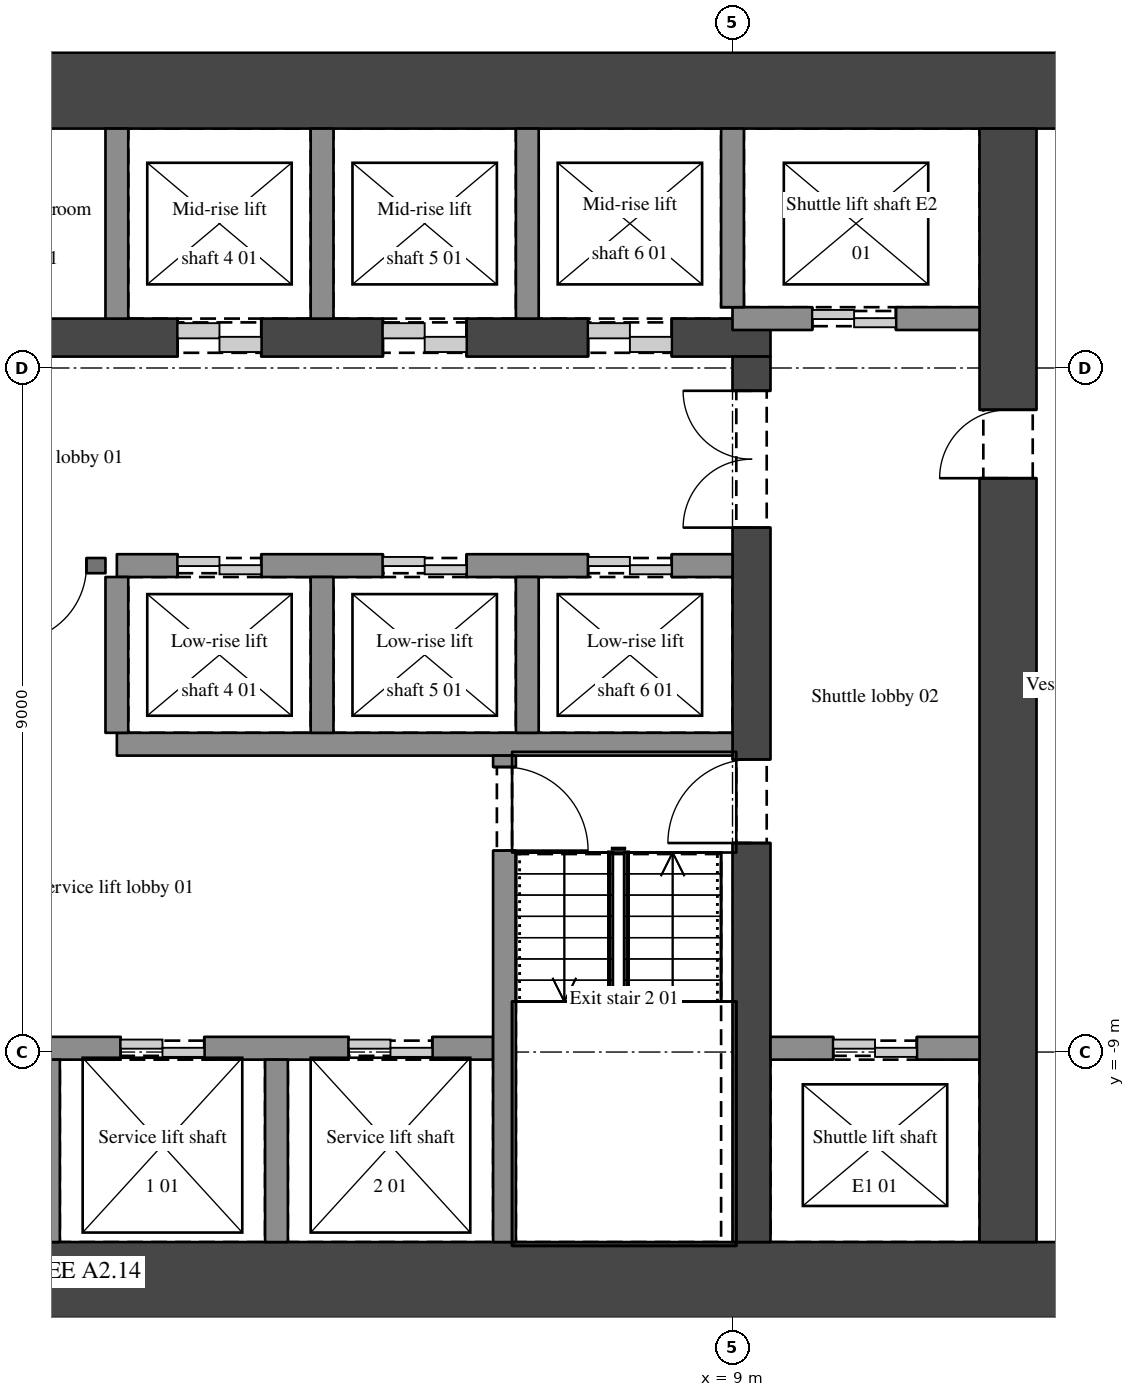
"""IFC4 building model, lengths in metres.
Left out: names, types, materials, properties, quantities, classifications, styles, units other than length and angle.
Written with IfcOpenShell. Run it as: python <this file> out.ifc"""

import sys

from ifc_helpers import new_model, si_unit, direction, frame, frame_2d, origin, place, context, subcontext, project, spatial, rectangle, extrude, element, fill, save


model = new_model("IFC4")
c1 = context("Model", 3, precision=1e-05, world=origin(), true_north=direction((0.0, 1.0)))
c2 = subcontext(c1, "Body", "Model", "MODEL_VIEW")
j1 = project(units=[si_unit("LENGTHUNIT", "METRE"), si_unit("PLANEANGLEUNIT", "RADIAN")], contexts=[c1])
p1 = place(None, origin())
s1 = spatial("IfcSite", under=j1, at=p1, CompositionType="ELEMENT")
p2 = place(p1, origin())
s2 = spatial("IfcBuilding", under=s1, at=p2, CompositionType="ELEMENT")
p3 = place(p2, frame((0.0, 0.0, 108.9)))
s3 = spatial("IfcBuildingStorey", under=s2, at=p3, CompositionType="ELEMENT", Elevation=108.9)
for number, where, z_axis, x_axis in (
    (1, (-15.0, -12.0, 0.0), (0.0, 0.0, 1.0), (1.0, 0.0, 0.0)),
    (2, (-15.0, 3.65, 0.0), (0.0, 0.0, 1.0), (1.0, 0.0, 0.0)),
):
    element("IfcWall", number, at=place(p3, frame(where, z_axis=z_axis, x_axis=x_axis)), inside=s3, PredefinedType="SHEAR", context=c2, shape_type="SweptSolid", body=[
        extrude(rectangle(XDim=30.0, YDim=1.0, at=frame_2d((15.0, 0.0))), origin(), (0.0, 0.0, 1.0), 5.4),
    ])
p4 = place(p3, frame((12.625, -11.5, 0.0), z_axis=(0.0, 0.0, 1.0), x_axis=(0.0, 1.0, 0.0)))
e3 = element("IfcWall", 3, at=p4, inside=s3, PredefinedType="SHEAR", context=c2, shape_type="SweptSolid", body=[
    extrude(rectangle(XDim=14.65, YDim=0.75, at=frame_2d((7.325, 0.0))), origin(), (0.0, 0.0, 1.0), 5.4),
])
p5 = place(p4, frame((10.05, 0.0, 0.0)))
e4 = element("IfcOpeningElement", 4, at=p5, cuts=e3, PredefinedType="OPENING", context=c2, shape_type="SweptSolid", body=[
    extrude(rectangle(XDim=0.9, YDim=2.1, at=frame_2d((0.45, 1.05))), frame((0.0, 0.385, 0.0), z_axis=(0.0, -1.0, 0.0), x_axis=(1.0, 0.0, 0.0)), (0.0, 0.0, 1.0), 0.77),
])
p6 = place(p3, frame((-9.5, 0.4, 0.0), z_axis=(0.0, 0.0, 1.0), x_axis=(1.0, 0.0, 0.0)))
e5 = element("IfcWall", 5, at=p6, inside=s3, PredefinedType="SHEAR", context=c2, shape_type="SweptSolid", body=[
    extrude(rectangle(XDim=19.0, YDim=0.5, at=frame_2d((9.5, 0.0))), origin(), (0.0, 0.0, 1.0), 5.4),
])
p7 = place(p6, frame((1.3, 0.0, 0.0)))
e6 = element("IfcOpeningElement", 6, at=p7, cuts=e5, PredefinedType="OPENING", context=c2, shape_type="SweptSolid", body=[
    extrude(rectangle(XDim=1.1, YDim=2.1, at=frame_2d((0.55, 1.05))), frame((0.0, 0.26, 0.0), z_axis=(0.0, -1.0, 0.0), x_axis=(1.0, 0.0, 0.0)), (0.0, 0.0, 1.0), 0.52),
])
p8 = place(p6, frame((4.0, 0.0, 0.0)))
e7 = element("IfcOpeningElement", 7, at=p8, cuts=e5, PredefinedType="OPENING", context=c2, shape_type="SweptSolid", body=[
    extrude(rectangle(XDim=1.1, YDim=2.1, at=frame_2d((0.55, 1.05))), frame((0.0, 0.26, 0.0), z_axis=(0.0, -1.0, 0.0), x_axis=(1.0, 0.0, 0.0)), (0.0, 0.0, 1.0), 0.52),
])
p9 = place(p6, frame((6.7, 0.0, 0.0)))
e8 = element("IfcOpeningElement", 8, at=p9, cuts=e5, PredefinedType="OPENING", context=c2, shape_type="SweptSolid", body=[
    extrude(rectangle(XDim=1.1, YDim=2.1, at=frame_2d((0.55, 1.05))), frame((0.0, 0.26, 0.0), z_axis=(0.0, -1.0, 0.0), x_axis=(1.0, 0.0, 0.0)), (0.0, 0.0, 1.0), 0.52),
])
p10 = place(p6, frame((11.2, 0.0, 0.0)))
e9 = element("IfcOpeningElement", 9, at=p10, cuts=e5, PredefinedType="OPENING", context=c2, shape_type="SweptSolid", body=[
    extrude(rectangle(XDim=1.1, YDim=2.1, at=frame_2d((0.55, 1.05))), frame((0.0, 0.26, 0.0), z_axis=(0.0, -1.0, 0.0), x_axis=(1.0, 0.0, 0.0)), (0.0, 0.0, 1.0), 0.52),
])
p11 = place(p6, frame((13.9, 0.0, 0.0)))
e10 = element("IfcOpeningElement", 10, at=p11, cuts=e5, PredefinedType="OPENING", context=c2, shape_type="SweptSolid", body=[
    extrude(rectangle(XDim=1.1, YDim=2.1, at=frame_2d((0.55, 1.05))), frame((0.0, 0.26, 0.0), z_axis=(0.0, -1.0, 0.0), x_axis=(1.0, 0.0, 0.0)), (0.0, 0.0, 1.0), 0.52),
])
p12 = place(p6, frame((16.6, 0.0, 0.0)))
e11 = element("IfcOpeningElement", 11, at=p12, cuts=e5, PredefinedType="OPENING", context=c2, shape_type="SweptSolid", body=[
    extrude(rectangle(XDim=1.1, YDim=2.1, at=frame_2d((0.55, 1.05))), frame((0.0, 0.26, 0.0), z_axis=(0.0, -1.0, 0.0), x_axis=(1.0, 0.0, 0.0)), (0.0, 0.0, 1.0), 0.52),
])
p13 = place(p3, frame((9.25, -11.5, 0.0), z_axis=(0.0, 0.0, 1.0), x_axis=(0.0, 1.0, 0.0)))
e12 = element("IfcWall", 12, at=p13, inside=s3, PredefinedType="SHEAR", context=c2, shape_type="SweptSolid", body=[
    extrude(rectangle(XDim=11.65, YDim=0.5, at=frame_2d((5.825, 0.0))), origin(), (0.0, 0.0, 1.0), 5.4),
])
p14 = place(p13, frame((9.4, 0.0, 0.0)))
e13 = element("IfcOpeningElement", 13, at=p14, cuts=e12, PredefinedType="OPENING", context=c2, shape_type="SweptSolid", body=[
    extrude(rectangle(XDim=1.8, YDim=2.1, at=frame_2d((0.9, 1.05))), frame((0.0, 0.26, 0.0), z_axis=(0.0, -1.0, 0.0), x_axis=(1.0, 0.0, 0.0)), (0.0, 0.0, 1.0), 0.52),
])
p15 = place(p13, frame((5.25, 0.0, 0.0)))
e14 = element("IfcOpeningElement", 14, at=p15, cuts=e12, PredefinedType="OPENING", context=c2, shape_type="SweptSolid", body=[
    extrude(rectangle(XDim=1.1, YDim=2.1, at=frame_2d((0.55, 1.05))), frame((0.0, 0.26, 0.0), z_axis=(0.0, -1.0, 0.0), x_axis=(1.0, 0.0, 0.0)), (0.0, 0.0, 1.0), 0.52),
])
p16 = place(p3, frame((-5.85, -8.95, 0.0), z_axis=(0.0, 0.0, 1.0), x_axis=(1.0, 0.0, 0.0)))
e15 = element("IfcWall", 15, at=p16, inside=s3, PredefinedType="SHEAR", context=c2, shape_type="SweptSolid", body=[
    extrude(rectangle(XDim=11.7, YDim=0.3, at=frame_2d((5.85, 0.0))), origin(), (0.0, 0.0, 1.0), 5.4),
])
p17 = place(p16, frame((0.8, 0.0, 0.0)))
e16 = element("IfcOpeningElement", 16, at=p17, cuts=e15, PredefinedType="OPENING", context=c2, shape_type="SweptSolid", body=[
    extrude(rectangle(XDim=1.1, YDim=2.1, at=frame_2d((0.55, 1.05))), frame((0.0, 0.16, 0.0), z_axis=(0.0, -1.0, 0.0), x_axis=(1.0, 0.0, 0.0)), (0.0, 0.0, 1.0), 0.32),
])
p18 = place(p16, frame((3.8, 0.0, 0.0)))
e17 = element("IfcOpeningElement", 17, at=p18, cuts=e15, PredefinedType="OPENING", context=c2, shape_type="SweptSolid", body=[
    extrude(rectangle(XDim=1.1, YDim=2.1, at=frame_2d((0.55, 1.05))), frame((0.0, 0.16, 0.0), z_axis=(0.0, -1.0, 0.0), x_axis=(1.0, 0.0, 0.0)), (0.0, 0.0, 1.0), 0.32),
])
p19 = place(p16, frame((6.8, 0.0, 0.0)))
e18 = element("IfcOpeningElement", 18, at=p19, cuts=e15, PredefinedType="OPENING", context=c2, shape_type="SweptSolid", body=[
    extrude(rectangle(XDim=1.1, YDim=2.1, at=frame_2d((0.55, 1.05))), frame((0.0, 0.16, 0.0), z_axis=(0.0, -1.0, 0.0), x_axis=(1.0, 0.0, 0.0)), (0.0, 0.0, 1.0), 0.32),
])
p20 = place(p16, frame((9.8, 0.0, 0.0)))
e19 = element("IfcOpeningElement", 19, at=p20, cuts=e15, PredefinedType="OPENING", context=c2, shape_type="SweptSolid", body=[
    extrude(rectangle(XDim=1.1, YDim=2.1, at=frame_2d((0.55, 1.05))), frame((0.0, 0.16, 0.0), z_axis=(0.0, -1.0, 0.0), x_axis=(1.0, 0.0, 0.0)), (0.0, 0.0, 1.0), 0.32),
])
p21 = place(p3, frame((9.5, -8.95, 0.0), z_axis=(0.0, 0.0, 1.0), x_axis=(1.0, 0.0, 0.0)))
e20 = element("IfcWall", 20, at=p21, inside=s3, PredefinedType="SHEAR", context=c2, shape_type="SweptSolid", body=[
    extrude(rectangle(XDim=2.75, YDim=0.3, at=frame_2d((1.375, 0.0))), origin(), (0.0, 0.0, 1.0), 5.4),
])
p22 = place(p21, frame((0.825, 0.0, 0.0)))
e21 = element("IfcOpeningElement", 21, at=p22, cuts=e20, PredefinedType="OPENING", context=c2, shape_type="SweptSolid", body=[
    extrude(rectangle(XDim=1.1, YDim=2.1, at=frame_2d((0.55, 1.05))), frame((0.0, 0.16, 0.0), z_axis=(0.0, -1.0, 0.0), x_axis=(1.0, 0.0, 0.0)), (0.0, 0.0, 1.0), 0.32),
])
p23 = place(p3, frame((0.9, -4.95, 0.0), z_axis=(0.0, 0.0, 1.0), x_axis=(1.0, 0.0, 0.0)))
e22 = element("IfcWall", 22, at=p23, inside=s3, PredefinedType="SHEAR", context=c2, shape_type="SweptSolid", body=[
    extrude(rectangle(XDim=8.1, YDim=0.3, at=frame_2d((4.05, 0.0))), origin(), (0.0, 0.0, 1.0), 5.4),
])
p24 = place(p3, frame((0.75, -2.6, 0.0), z_axis=(0.0, 0.0, 1.0), x_axis=(-1.0, 0.0, 0.0)))
e23 = element("IfcWall", 23, at=p24, inside=s3, PredefinedType="SOLIDWALL", context=c2, shape_type="SweptSolid", body=[
    extrude(rectangle(XDim=1.5, YDim=0.2, at=frame_2d((0.75, 0.0))), origin(), (0.0, 0.0, 1.0), 5.1),
])
p25 = place(p24, frame((0.25, 0.0, 0.0)))
e24 = element("IfcOpeningElement", 24, at=p25, cuts=e23, PredefinedType="OPENING", context=c2, shape_type="SweptSolid", body=[
    extrude(rectangle(XDim=1.0, YDim=2.1, at=frame_2d((0.5, 1.05))), frame((0.0, 0.11, 0.0), z_axis=(0.0, -1.0, 0.0), x_axis=(1.0, 0.0, 0.0)), (0.0, 0.0, 1.0), 0.22),
])
p26 = place(p3, frame((0.9, -2.6, 0.0), z_axis=(0.0, 0.0, 1.0), x_axis=(1.0, 0.0, 0.0)))
e25 = element("IfcWall", 25, at=p26, inside=s3, PredefinedType="SHEAR", context=c2, shape_type="SweptSolid", body=[
    extrude(rectangle(XDim=8.1, YDim=0.3, at=frame_2d((4.05, 0.0))), origin(), (0.0, 0.0, 1.0), 5.4),
])
p27 = place(p26, frame((0.8, 0.0, 0.0)))
e26 = element("IfcOpeningElement", 26, at=p27, cuts=e25, PredefinedType="OPENING", context=c2, shape_type="SweptSolid", body=[
    extrude(rectangle(XDim=1.1, YDim=2.1, at=frame_2d((0.55, 1.05))), frame((0.0, 0.16, 0.0), z_axis=(0.0, -1.0, 0.0), x_axis=(1.0, 0.0, 0.0)), (0.0, 0.0, 1.0), 0.32),
])
p28 = place(p26, frame((3.5, 0.0, 0.0)))
e27 = element("IfcOpeningElement", 27, at=p28, cuts=e25, PredefinedType="OPENING", context=c2, shape_type="SweptSolid", body=[
    extrude(rectangle(XDim=1.1, YDim=2.1, at=frame_2d((0.55, 1.05))), frame((0.0, 0.16, 0.0), z_axis=(0.0, -1.0, 0.0), x_axis=(1.0, 0.0, 0.0)), (0.0, 0.0, 1.0), 0.32),
])
p29 = place(p26, frame((6.2, 0.0, 0.0)))
e28 = element("IfcOpeningElement", 28, at=p29, cuts=e25, PredefinedType="OPENING", context=c2, shape_type="SweptSolid", body=[
    extrude(rectangle(XDim=1.1, YDim=2.1, at=frame_2d((0.55, 1.05))), frame((0.0, 0.16, 0.0), z_axis=(0.0, -1.0, 0.0), x_axis=(1.0, 0.0, 0.0)), (0.0, 0.0, 1.0), 0.32),
])
p30 = place(p3, frame((12.25, 0.65, 0.0), z_axis=(0.0, 0.0, 1.0), x_axis=(-1.0, 0.0, 0.0)))
e29 = element("IfcWall", 29, at=p30, inside=s3, PredefinedType="SHEAR", context=c2, shape_type="SweptSolid", body=[
    extrude(rectangle(XDim=3.25, YDim=0.3, at=frame_2d((1.625, 0.0))), origin(), (0.0, 0.0, 1.0), 5.4),
])
p31 = place(p30, frame((1.1, 0.0, 0.0)))
e30 = element("IfcOpeningElement", 30, at=p31, cuts=e29, PredefinedType="OPENING", context=c2, shape_type="SweptSolid", body=[
    extrude(rectangle(XDim=1.1, YDim=2.1, at=frame_2d((0.55, 1.05))), frame((0.0, 0.16, 0.0), z_axis=(0.0, -1.0, 0.0), x_axis=(1.0, 0.0, 0.0)), (0.0, 0.0, 1.0), 0.32),
])
p32 = place(p3, frame((0.0, -11.5, 0.0), z_axis=(0.0, 0.0, 1.0), x_axis=(0.0, 1.0, 0.0)))
e31 = element("IfcWall", 31, at=p32, inside=s3, PredefinedType="SHEAR", context=c2, shape_type="SweptSolid", body=[
    extrude(rectangle(XDim=2.4, YDim=0.3, at=frame_2d((1.2, 0.0))), origin(), (0.0, 0.0, 1.0), 5.4),
])
p33 = place(p3, frame((0.9, -4.8, 0.0), z_axis=(0.0, 0.0, 1.0), x_axis=(0.0, 1.0, 0.0)))
e32 = element("IfcWall", 32, at=p33, inside=s3, PredefinedType="SHEAR", context=c2, shape_type="SweptSolid", body=[
    extrude(rectangle(XDim=2.05, YDim=0.3, at=frame_2d((1.025, 0.0))), origin(), (0.0, 0.0, 1.0), 5.4),
])
p34 = place(p3, frame((0.9, 0.65, 0.0), z_axis=(0.0, 0.0, 1.0), x_axis=(0.0, 1.0, 0.0)))
e33 = element("IfcWall", 33, at=p34, inside=s3, PredefinedType="SHEAR", context=c2, shape_type="SweptSolid", body=[
    extrude(rectangle(XDim=2.5, YDim=0.3, at=frame_2d((1.25, 0.0))), origin(), (0.0, 0.0, 1.0), 5.4),
])
p35 = place(p3, frame((3.0, -11.5, 0.0), z_axis=(0.0, 0.0, 1.0), x_axis=(0.0, 1.0, 0.0)))
e34 = element("IfcWall", 34, at=p35, inside=s3, PredefinedType="SHEAR", context=c2, shape_type="SweptSolid", body=[
    extrude(rectangle(XDim=2.4, YDim=0.3, at=frame_2d((1.2, 0.0))), origin(), (0.0, 0.0, 1.0), 5.4),
])
p36 = place(p3, frame((3.6, -4.8, 0.0), z_axis=(0.0, 0.0, 1.0), x_axis=(0.0, 1.0, 0.0)))
e35 = element("IfcWall", 35, at=p36, inside=s3, PredefinedType="SHEAR", context=c2, shape_type="SweptSolid", body=[
    extrude(rectangle(XDim=2.05, YDim=0.3, at=frame_2d((1.025, 0.0))), origin(), (0.0, 0.0, 1.0), 5.4),
])
p37 = place(p3, frame((3.6, 0.65, 0.0), z_axis=(0.0, 0.0, 1.0), x_axis=(0.0, 1.0, 0.0)))
e36 = element("IfcWall", 36, at=p37, inside=s3, PredefinedType="SHEAR", context=c2, shape_type="SweptSolid", body=[
    extrude(rectangle(XDim=2.5, YDim=0.3, at=frame_2d((1.25, 0.0))), origin(), (0.0, 0.0, 1.0), 5.4),
])
p38 = place(p3, frame((6.0, -5.1, 0.0), z_axis=(0.0, 0.0, 1.0), x_axis=(0.0, -1.0, 0.0)))
e37 = element("IfcWall", 37, at=p38, inside=s3, PredefinedType="SHEAR", context=c2, shape_type="SweptSolid", body=[
    extrude(rectangle(XDim=6.4, YDim=0.3, at=frame_2d((3.2, 0.0))), origin(), (0.0, 0.0, 1.0), 5.4),
])
p39 = place(p38, frame((0.15, 0.0, 0.0)))
e38 = element("IfcOpeningElement", 38, at=p39, cuts=e37, PredefinedType="OPENING", context=c2, shape_type="SweptSolid", body=[
    extrude(rectangle(XDim=1.1, YDim=2.1, at=frame_2d((0.55, 1.05))), frame((0.0, 0.16, 0.0), z_axis=(0.0, -1.0, 0.0), x_axis=(1.0, 0.0, 0.0)), (0.0, 0.0, 1.0), 0.32),
])
p40 = place(p3, frame((6.3, -4.8, 0.0), z_axis=(0.0, 0.0, 1.0), x_axis=(0.0, 1.0, 0.0)))
e39 = element("IfcWall", 39, at=p40, inside=s3, PredefinedType="SHEAR", context=c2, shape_type="SweptSolid", body=[
    extrude(rectangle(XDim=2.05, YDim=0.3, at=frame_2d((1.025, 0.0))), origin(), (0.0, 0.0, 1.0), 5.4),
])
p41 = place(p3, frame((6.3, 0.65, 0.0), z_axis=(0.0, 0.0, 1.0), x_axis=(0.0, 1.0, 0.0)))
e40 = element("IfcWall", 40, at=p41, inside=s3, PredefinedType="SHEAR", context=c2, shape_type="SweptSolid", body=[
    extrude(rectangle(XDim=2.5, YDim=0.3, at=frame_2d((1.25, 0.0))), origin(), (0.0, 0.0, 1.0), 5.4),
])
p42 = place(p3, frame((9.0, 0.8, 0.0), z_axis=(0.0, 0.0, 1.0), x_axis=(0.0, 1.0, 0.0)))
e41 = element("IfcWall", 41, at=p42, inside=s3, PredefinedType="SHEAR", context=c2, shape_type="SweptSolid", body=[
    extrude(rectangle(XDim=2.35, YDim=0.3, at=frame_2d((1.175, 0.0))), origin(), (0.0, 0.0, 1.0), 5.4),
])
p43 = place(p14, origin())
e42 = element("IfcDoor", 42, at=p43, inside=s3, OperationType="DOUBLE_DOOR_SINGLE_SWING", PredefinedType="DOOR", context=c2, shape_type="SweptSolid", body=[
    extrude(rectangle(XDim=1.8, YDim=2.1, at=frame_2d((0.9, 1.05))), frame((0.0, 0.025, 0.0), z_axis=(0.0, -1.0, 0.0), x_axis=(1.0, 0.0, 0.0)), (0.0, 0.0, 1.0), 0.05),
])
fill(e13, e42)
p44 = place(p25, origin())
e43 = element("IfcDoor", 43, at=p44, inside=s3, OperationType="SINGLE_SWING_RIGHT", PredefinedType="DOOR", context=c2, shape_type="SweptSolid", body=[
    extrude(rectangle(XDim=1.0, YDim=2.1, at=frame_2d((0.5, 1.05))), frame((0.0, 0.025, 0.0), z_axis=(0.0, -1.0, 0.0), x_axis=(1.0, 0.0, 0.0)), (0.0, 0.0, 1.0), 0.05),
])
fill(e24, e43)
p45 = place(p39, origin())
e44 = element("IfcDoor", 44, at=p45, inside=s3, OperationType="SINGLE_SWING_RIGHT", PredefinedType="DOOR", context=c2, shape_type="SweptSolid", body=[
    extrude(rectangle(XDim=1.1, YDim=2.1, at=frame_2d((0.55, 1.05))), frame((0.0, 0.025, 0.0), z_axis=(0.0, -1.0, 0.0), x_axis=(1.0, 0.0, 0.0)), (0.0, 0.0, 1.0), 0.05),
])
fill(e38, e44)
p46 = place(p15, origin())
e45 = element("IfcDoor", 45, at=p46, inside=s3, OperationType="SINGLE_SWING_LEFT", PredefinedType="DOOR", context=c2, shape_type="SweptSolid", body=[
    extrude(rectangle(XDim=1.1, YDim=2.1, at=frame_2d((0.55, 1.05))), frame((0.0, 0.025, 0.0), z_axis=(0.0, -1.0, 0.0), x_axis=(1.0, 0.0, 0.0)), (0.0, 0.0, 1.0), 0.05),
])
fill(e14, e45)
p47 = place(p5, origin())
e46 = element("IfcDoor", 46, at=p47, inside=s3, OperationType="SINGLE_SWING_LEFT", PredefinedType="DOOR", context=c2, shape_type="SweptSolid", body=[
    extrude(rectangle(XDim=0.9, YDim=2.1, at=frame_2d((0.45, 1.05))), frame((0.0, 0.025, 0.0), z_axis=(0.0, -1.0, 0.0), x_axis=(1.0, 0.0, 0.0)), (0.0, 0.0, 1.0), 0.05),
])
fill(e4, e46)
p48 = place(p27, origin())
e47 = element("IfcDoor", 47, at=p48, inside=s3, OperationType="DOUBLE_DOOR_SLIDING", PredefinedType="DOOR", context=c2, shape_type="SweptSolid", body=[
    extrude(rectangle(XDim=1.1, YDim=2.1, at=frame_2d((0.55, 1.05))), frame((0.0, 0.025, 0.0), z_axis=(0.0, -1.0, 0.0), x_axis=(1.0, 0.0, 0.0)), (0.0, 0.0, 1.0), 0.05),
])
fill(e26, e47)
p49 = place(p28, origin())
e48 = element("IfcDoor", 48, at=p49, inside=s3, OperationType="DOUBLE_DOOR_SLIDING", PredefinedType="DOOR", context=c2, shape_type="SweptSolid", body=[
    extrude(rectangle(XDim=1.1, YDim=2.1, at=frame_2d((0.55, 1.05))), frame((0.0, 0.025, 0.0), z_axis=(0.0, -1.0, 0.0), x_axis=(1.0, 0.0, 0.0)), (0.0, 0.0, 1.0), 0.05),
])
fill(e27, e48)
p50 = place(p29, origin())
e49 = element("IfcDoor", 49, at=p50, inside=s3, OperationType="DOUBLE_DOOR_SLIDING", PredefinedType="DOOR", context=c2, shape_type="SweptSolid", body=[
    extrude(rectangle(XDim=1.1, YDim=2.1, at=frame_2d((0.55, 1.05))), frame((0.0, 0.025, 0.0), z_axis=(0.0, -1.0, 0.0), x_axis=(1.0, 0.0, 0.0)), (0.0, 0.0, 1.0), 0.05),
])
fill(e28, e49)
p51 = place(p10, origin())
e50 = element("IfcDoor", 50, at=p51, inside=s3, OperationType="DOUBLE_DOOR_SLIDING", PredefinedType="DOOR", context=c2, shape_type="SweptSolid", body=[
    extrude(rectangle(XDim=1.1, YDim=2.1, at=frame_2d((0.55, 1.05))), frame((0.0, 0.025, 0.0), z_axis=(0.0, -1.0, 0.0), x_axis=(1.0, 0.0, 0.0)), (0.0, 0.0, 1.0), 0.05),
])
fill(e9, e50)
p52 = place(p11, origin())
e51 = element("IfcDoor", 51, at=p52, inside=s3, OperationType="DOUBLE_DOOR_SLIDING", PredefinedType="DOOR", context=c2, shape_type="SweptSolid", body=[
    extrude(rectangle(XDim=1.1, YDim=2.1, at=frame_2d((0.55, 1.05))), frame((0.0, 0.025, 0.0), z_axis=(0.0, -1.0, 0.0), x_axis=(1.0, 0.0, 0.0)), (0.0, 0.0, 1.0), 0.05),
])
fill(e10, e51)
p53 = place(p12, origin())
e52 = element("IfcDoor", 52, at=p53, inside=s3, OperationType="DOUBLE_DOOR_SLIDING", PredefinedType="DOOR", context=c2, shape_type="SweptSolid", body=[
    extrude(rectangle(XDim=1.1, YDim=2.1, at=frame_2d((0.55, 1.05))), frame((0.0, 0.025, 0.0), z_axis=(0.0, -1.0, 0.0), x_axis=(1.0, 0.0, 0.0)), (0.0, 0.0, 1.0), 0.05),
])
fill(e11, e52)
p54 = place(p31, origin())
e53 = element("IfcDoor", 53, at=p54, inside=s3, OperationType="DOUBLE_DOOR_SLIDING", PredefinedType="DOOR", context=c2, shape_type="SweptSolid", body=[
    extrude(rectangle(XDim=1.1, YDim=2.1, at=frame_2d((0.55, 1.05))), frame((0.0, 0.025, 0.0), z_axis=(0.0, -1.0, 0.0), x_axis=(1.0, 0.0, 0.0)), (0.0, 0.0, 1.0), 0.05),
])
fill(e30, e53)
p55 = place(p22, origin())
e54 = element("IfcDoor", 54, at=p55, inside=s3, OperationType="DOUBLE_DOOR_SLIDING", PredefinedType="DOOR", context=c2, shape_type="SweptSolid", body=[
    extrude(rectangle(XDim=1.1, YDim=2.1, at=frame_2d((0.55, 1.05))), frame((0.0, 0.025, 0.0), z_axis=(0.0, -1.0, 0.0), x_axis=(1.0, 0.0, 0.0)), (0.0, 0.0, 1.0), 0.05),
])
fill(e21, e54)
p56 = place(p19, origin())
e55 = element("IfcDoor", 55, at=p56, inside=s3, OperationType="DOUBLE_DOOR_SLIDING", PredefinedType="DOOR", context=c2, shape_type="SweptSolid", body=[
    extrude(rectangle(XDim=1.1, YDim=2.1, at=frame_2d((0.55, 1.05))), frame((0.0, 0.025, 0.0), z_axis=(0.0, -1.0, 0.0), x_axis=(1.0, 0.0, 0.0)), (0.0, 0.0, 1.0), 0.05),
])
fill(e18, e55)
p57 = place(p20, origin())
e56 = element("IfcDoor", 56, at=p57, inside=s3, OperationType="DOUBLE_DOOR_SLIDING", PredefinedType="DOOR", context=c2, shape_type="SweptSolid", body=[
    extrude(rectangle(XDim=1.1, YDim=2.1, at=frame_2d((0.55, 1.05))), frame((0.0, 0.025, 0.0), z_axis=(0.0, -1.0, 0.0), x_axis=(1.0, 0.0, 0.0)), (0.0, 0.0, 1.0), 0.05),
])
fill(e19, e56)
save(model, sys.argv[1])
